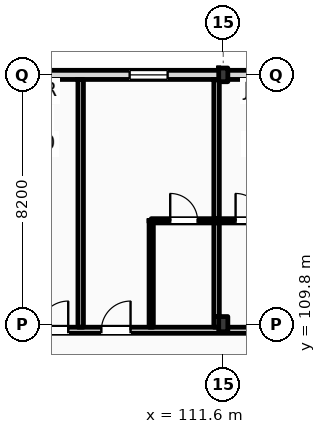
"""IFC4 building model, lengths in metres.
Left out: names, types, materials, properties, quantities, classifications, styles, units other than length and angle.
Written with IfcOpenShell. Run it as: python <this file> out.ifc"""

import sys

from ifc_helpers import new_model, si_unit, direction, frame, frame_2d, origin, origin_2d, place, context, subcontext, project, spatial, rectangle, i_section, extrude, element, fill, save


model = new_model("IFC4")
c1 = context("Model", 3, precision=1e-05, world=origin(), true_north=direction((0.0, 1.0)))
c2 = subcontext(c1, "Body", "Model", "MODEL_VIEW")
j1 = project(units=[si_unit("LENGTHUNIT", "METRE"), si_unit("PLANEANGLEUNIT", "RADIAN")], contexts=[c1])
p1 = place(None, origin())
s1 = spatial("IfcSite", under=j1, at=p1, CompositionType="ELEMENT")
p2 = place(p1, origin())
s2 = spatial("IfcBuilding", under=s1, at=p2, CompositionType="ELEMENT")
p3 = place(p2, frame((0.0, 0.0, 24.6)))
s3 = spatial("IfcBuildingStorey", under=s2, at=p3, CompositionType="ELEMENT", Elevation=24.6)
p4 = place(p3, frame((111.6, 109.8, 0.0), z_axis=(0.0, 0.0, 1.0), x_axis=(1.0, 0.0, 0.0)))
e1 = element("IfcColumn", 1, at=p4, inside=s3, PredefinedType="COLUMN", context=c2, shape_type="SweptSolid", body=[
    extrude(i_section(OverallWidth=0.3, OverallDepth=0.5, WebThickness=0.014, FlangeThickness=0.028, FilletRadius=0.027, at=origin_2d()), origin(), (0.0, 0.0, 1.0), 3.6),
])
p5 = place(p3, frame((111.6, 118.0, 0.0), z_axis=(0.0, 0.0, 1.0), x_axis=(1.0, 0.0, 0.0)))
e2 = element("IfcColumn", 2, at=p5, inside=s3, PredefinedType="COLUMN", context=c2, shape_type="SweptSolid", body=[
    extrude(i_section(OverallWidth=0.3, OverallDepth=0.45, WebThickness=0.014, FlangeThickness=0.026, FilletRadius=0.027, at=origin_2d()), origin(), (0.0, 0.0, 1.0), 3.6),
])
p6 = place(p3, frame((22.5, 118.0, 0.0), z_axis=(0.0, 0.0, 1.0), x_axis=(1.0, 0.0, 0.0)))
e3 = element("IfcWall", 3, at=p6, inside=s3, PredefinedType="STANDARD", context=c2, shape_type="SweptSolid", body=[
    extrude(rectangle(XDim=97.5, YDim=0.3, at=frame_2d((48.75, 0.0))), origin(), (0.0, 0.0, 1.0), 2.78),
])
p7 = place(p6, frame((0.91, 0.0, 0.9)))
e4 = element("IfcOpeningElement", 4, at=p7, cuts=e3, PredefinedType="OPENING", context=c2, shape_type="SweptSolid", body=[
    extrude(rectangle(XDim=0.9, YDim=1.7, at=frame_2d((0.45, 0.85))), frame((0.0, 0.16, 0.0), z_axis=(0.0, -1.0, 0.0), x_axis=(1.0, 0.0, 0.0)), (0.0, 0.0, 1.0), 0.32),
])
p8 = place(p6, frame((6.275, 0.0, 0.0)))
e5 = element("IfcOpeningElement", 5, at=p8, cuts=e3, PredefinedType="OPENING", context=c2, shape_type="SweptSolid", body=[
    extrude(rectangle(XDim=1.2, YDim=2.25, at=frame_2d((0.6, 1.125))), frame((0.0, 0.16, 0.0), z_axis=(0.0, -1.0, 0.0), x_axis=(1.0, 0.0, 0.0)), (0.0, 0.0, 1.0), 0.32),
])
p9 = place(p6, frame((11.42, 0.0, 0.9)))
e6 = element("IfcOpeningElement", 6, at=p9, cuts=e3, PredefinedType="OPENING", context=c2, shape_type="SweptSolid", body=[
    extrude(rectangle(XDim=1.35, YDim=1.7, at=frame_2d((0.675, 0.85))), frame((0.0, 0.16, 0.0), z_axis=(0.0, -1.0, 0.0), x_axis=(1.0, 0.0, 0.0)), (0.0, 0.0, 1.0), 0.32),
])
p10 = place(p6, frame((14.345, 0.0, 0.9)))
e7 = element("IfcOpeningElement", 7, at=p10, cuts=e3, PredefinedType="OPENING", context=c2, shape_type="SweptSolid", body=[
    extrude(rectangle(XDim=1.8, YDim=1.7, at=frame_2d((0.9, 0.85))), frame((0.0, 0.16, 0.0), z_axis=(0.0, -1.0, 0.0), x_axis=(1.0, 0.0, 0.0)), (0.0, 0.0, 1.0), 0.32),
])
p11 = place(p6, frame((19.27, 0.0, 0.9)))
e8 = element("IfcOpeningElement", 8, at=p11, cuts=e3, PredefinedType="OPENING", context=c2, shape_type="SweptSolid", body=[
    extrude(rectangle(XDim=1.95, YDim=1.7, at=frame_2d((0.975, 0.85))), frame((0.0, 0.16, 0.0), z_axis=(0.0, -1.0, 0.0), x_axis=(1.0, 0.0, 0.0)), (0.0, 0.0, 1.0), 0.32),
])
p12 = place(p6, frame((22.97, 0.0, 0.0)))
e9 = element("IfcOpeningElement", 9, at=p12, cuts=e3, PredefinedType="OPENING", context=c2, shape_type="SweptSolid", body=[
    extrude(rectangle(XDim=1.2, YDim=2.25, at=frame_2d((0.6, 1.125))), frame((0.0, 0.16, 0.0), z_axis=(0.0, -1.0, 0.0), x_axis=(1.0, 0.0, 0.0)), (0.0, 0.0, 1.0), 0.32),
])
p13 = place(p6, frame((26.92, 0.0, 0.9)))
e10 = element("IfcOpeningElement", 10, at=p13, cuts=e3, PredefinedType="OPENING", context=c2, shape_type="SweptSolid", body=[
    extrude(rectangle(XDim=2.25, YDim=1.7, at=frame_2d((1.125, 0.85))), frame((0.0, 0.16, 0.0), z_axis=(0.0, -1.0, 0.0), x_axis=(1.0, 0.0, 0.0)), (0.0, 0.0, 1.0), 0.32),
])
p14 = place(p6, frame((30.645, 0.0, 0.9)))
e11 = element("IfcOpeningElement", 11, at=p14, cuts=e3, PredefinedType="OPENING", context=c2, shape_type="SweptSolid", body=[
    extrude(rectangle(XDim=2.4, YDim=1.7, at=frame_2d((1.2, 0.85))), frame((0.0, 0.16, 0.0), z_axis=(0.0, -1.0, 0.0), x_axis=(1.0, 0.0, 0.0)), (0.0, 0.0, 1.0), 0.32),
])
p15 = place(p6, frame((36.71, 0.0, 0.0)))
e12 = element("IfcOpeningElement", 12, at=p15, cuts=e3, PredefinedType="OPENING", context=c2, shape_type="SweptSolid", body=[
    extrude(rectangle(XDim=1.2, YDim=2.25, at=frame_2d((0.6, 1.125))), frame((0.0, 0.16, 0.0), z_axis=(0.0, -1.0, 0.0), x_axis=(1.0, 0.0, 0.0)), (0.0, 0.0, 1.0), 0.32),
])
p16 = place(p6, frame((39.17, 0.0, 0.0)))
e13 = element("IfcOpeningElement", 13, at=p16, cuts=e3, PredefinedType="OPENING", context=c2, shape_type="SweptSolid", body=[
    extrude(rectangle(XDim=1.2, YDim=2.25, at=frame_2d((0.6, 1.125))), frame((0.0, 0.16, 0.0), z_axis=(0.0, -1.0, 0.0), x_axis=(1.0, 0.0, 0.0)), (0.0, 0.0, 1.0), 0.32),
])
p17 = place(p6, frame((43.22, 0.0, 0.9)))
e14 = element("IfcOpeningElement", 14, at=p17, cuts=e3, PredefinedType="OPENING", context=c2, shape_type="SweptSolid", body=[
    extrude(rectangle(XDim=2.85, YDim=1.7, at=frame_2d((1.425, 0.85))), frame((0.0, 0.16, 0.0), z_axis=(0.0, -1.0, 0.0), x_axis=(1.0, 0.0, 0.0)), (0.0, 0.0, 1.0), 0.32),
])
p18 = place(p6, frame((47.29, 0.0, 0.9)))
e15 = element("IfcOpeningElement", 15, at=p18, cuts=e3, PredefinedType="OPENING", context=c2, shape_type="SweptSolid", body=[
    extrude(rectangle(XDim=1.35, YDim=1.7, at=frame_2d((0.675, 0.85))), frame((0.0, 0.16, 0.0), z_axis=(0.0, -1.0, 0.0), x_axis=(1.0, 0.0, 0.0)), (0.0, 0.0, 1.0), 0.32),
])
p19 = place(p6, frame((52.91, 0.0, 0.0)))
e16 = element("IfcOpeningElement", 16, at=p19, cuts=e3, PredefinedType="OPENING", context=c2, shape_type="SweptSolid", body=[
    extrude(rectangle(XDim=1.2, YDim=2.25, at=frame_2d((0.6, 1.125))), frame((0.0, 0.16, 0.0), z_axis=(0.0, -1.0, 0.0), x_axis=(1.0, 0.0, 0.0)), (0.0, 0.0, 1.0), 0.32),
])
p20 = place(p6, frame((55.69, 0.0, 0.9)))
e17 = element("IfcOpeningElement", 17, at=p20, cuts=e3, PredefinedType="OPENING", context=c2, shape_type="SweptSolid", body=[
    extrude(rectangle(XDim=0.9, YDim=1.7, at=frame_2d((0.45, 0.85))), frame((0.0, 0.16, 0.0), z_axis=(0.0, -1.0, 0.0), x_axis=(1.0, 0.0, 0.0)), (0.0, 0.0, 1.0), 0.32),
])
p21 = place(p6, frame((59.82, 0.0, 0.9)))
e18 = element("IfcOpeningElement", 18, at=p21, cuts=e3, PredefinedType="OPENING", context=c2, shape_type="SweptSolid", body=[
    extrude(rectangle(XDim=3.25, YDim=1.7, at=frame_2d((1.625, 0.85))), frame((0.0, 0.16, 0.0), z_axis=(0.0, -1.0, 0.0), x_axis=(1.0, 0.0, 0.0)), (0.0, 0.0, 1.0), 0.32),
])
p22 = place(p6, frame((65.89, 0.0, 0.9)))
e19 = element("IfcOpeningElement", 19, at=p22, cuts=e3, PredefinedType="OPENING", context=c2, shape_type="SweptSolid", body=[
    extrude(rectangle(XDim=1.1, YDim=1.7, at=frame_2d((0.55, 0.85))), frame((0.0, 0.16, 0.0), z_axis=(0.0, -1.0, 0.0), x_axis=(1.0, 0.0, 0.0)), (0.0, 0.0, 1.0), 0.32),
])
p23 = place(p6, frame((69.245, 0.0, 0.0)))
e20 = element("IfcOpeningElement", 20, at=p23, cuts=e3, PredefinedType="OPENING", context=c2, shape_type="SweptSolid", body=[
    extrude(rectangle(XDim=1.2, YDim=2.25, at=frame_2d((0.6, 1.125))), frame((0.0, 0.16, 0.0), z_axis=(0.0, -1.0, 0.0), x_axis=(1.0, 0.0, 0.0)), (0.0, 0.0, 1.0), 0.32),
])
p24 = place(p6, frame((73.69, 0.0, 0.9)))
e21 = element("IfcOpeningElement", 21, at=p24, cuts=e3, PredefinedType="OPENING", context=c2, shape_type="SweptSolid", body=[
    extrude(rectangle(XDim=1.8, YDim=1.7, at=frame_2d((0.9, 0.85))), frame((0.0, 0.16, 0.0), z_axis=(0.0, -1.0, 0.0), x_axis=(1.0, 0.0, 0.0)), (0.0, 0.0, 1.0), 0.32),
])
p25 = place(p6, frame((76.62, 0.0, 0.9)))
e22 = element("IfcOpeningElement", 22, at=p25, cuts=e3, PredefinedType="OPENING", context=c2, shape_type="SweptSolid", body=[
    extrude(rectangle(XDim=3.25, YDim=1.7, at=frame_2d((1.625, 0.85))), frame((0.0, 0.16, 0.0), z_axis=(0.0, -1.0, 0.0), x_axis=(1.0, 0.0, 0.0)), (0.0, 0.0, 1.0), 0.32),
])
p26 = place(p6, frame((81.895, 0.0, 0.9)))
e23 = element("IfcOpeningElement", 23, at=p26, cuts=e3, PredefinedType="OPENING", context=c2, shape_type="SweptSolid", body=[
    extrude(rectangle(XDim=1.1, YDim=1.5, at=frame_2d((0.55, 0.75))), frame((0.0, 0.16, 0.0), z_axis=(0.0, -1.0, 0.0), x_axis=(1.0, 0.0, 0.0)), (0.0, 0.0, 1.0), 0.32),
])
p27 = place(p6, frame((86.02, 0.0, 0.9)))
e24 = element("IfcOpeningElement", 24, at=p27, cuts=e3, PredefinedType="OPENING", context=c2, shape_type="SweptSolid", body=[
    extrude(rectangle(XDim=1.25, YDim=1.6, at=frame_2d((0.625, 0.8))), frame((0.0, 0.16, 0.0), z_axis=(0.0, -1.0, 0.0), x_axis=(1.0, 0.0, 0.0)), (0.0, 0.0, 1.0), 0.32),
])
p28 = place(p6, frame((90.145, 0.0, 0.9)))
e25 = element("IfcOpeningElement", 25, at=p28, cuts=e3, PredefinedType="OPENING", context=c2, shape_type="SweptSolid", body=[
    extrude(rectangle(XDim=1.4, YDim=1.7, at=frame_2d((0.7, 0.85))), frame((0.0, 0.16, 0.0), z_axis=(0.0, -1.0, 0.0), x_axis=(1.0, 0.0, 0.0)), (0.0, 0.0, 1.0), 0.32),
])
p29 = place(p6, frame((94.155, 0.0, 0.9)))
e26 = element("IfcOpeningElement", 26, at=p29, cuts=e3, PredefinedType="OPENING", context=c2, shape_type="SweptSolid", body=[
    extrude(rectangle(XDim=1.6, YDim=1.7, at=frame_2d((0.8, 0.85))), frame((0.0, 0.16, 0.0), z_axis=(0.0, -1.0, 0.0), x_axis=(1.0, 0.0, 0.0)), (0.0, 0.0, 1.0), 0.32),
])
p30 = place(p3, frame((10.65, 109.6, 0.0), z_axis=(0.0, 0.0, 1.0), x_axis=(1.0, 0.0, 0.0)))
e27 = element("IfcWall", 27, at=p30, inside=s3, PredefinedType="PARTITIONING", context=c2, shape_type="SweptSolid", body=[
    extrude(rectangle(XDim=109.21, YDim=0.2, at=frame_2d((54.605, 0.0))), origin(), (0.0, 0.0, 1.0), 2.78),
])
p31 = place(p30, frame((12.705, 0.0, 0.0)))
e28 = element("IfcOpeningElement", 28, at=p31, cuts=e27, PredefinedType="OPENING", context=c2, shape_type="SweptSolid", body=[
    extrude(rectangle(XDim=1.02, YDim=2.2, at=frame_2d((0.51, 1.1))), frame((0.0, 0.11, 0.0), z_axis=(0.0, -1.0, 0.0), x_axis=(1.0, 0.0, 0.0)), (0.0, 0.0, 1.0), 0.22),
])
p32 = place(p30, frame((19.26, 0.0, 0.0)))
e29 = element("IfcOpeningElement", 29, at=p32, cuts=e27, PredefinedType="OPENING", context=c2, shape_type="SweptSolid", body=[
    extrude(rectangle(XDim=1.02, YDim=2.2, at=frame_2d((0.51, 1.1))), frame((0.0, 0.11, 0.0), z_axis=(0.0, -1.0, 0.0), x_axis=(1.0, 0.0, 0.0)), (0.0, 0.0, 1.0), 0.22),
])
p33 = place(p30, frame((23.71, 0.0, 0.0)))
e30 = element("IfcOpeningElement", 30, at=p33, cuts=e27, PredefinedType="OPENING", context=c2, shape_type="SweptSolid", body=[
    extrude(rectangle(XDim=1.02, YDim=2.2, at=frame_2d((0.51, 1.1))), frame((0.0, 0.11, 0.0), z_axis=(0.0, -1.0, 0.0), x_axis=(1.0, 0.0, 0.0)), (0.0, 0.0, 1.0), 0.22),
])
p34 = place(p30, frame((27.66, 0.0, 0.0)))
e31 = element("IfcOpeningElement", 31, at=p34, cuts=e27, PredefinedType="OPENING", context=c2, shape_type="SweptSolid", body=[
    extrude(rectangle(XDim=1.02, YDim=2.2, at=frame_2d((0.51, 1.1))), frame((0.0, 0.11, 0.0), z_axis=(0.0, -1.0, 0.0), x_axis=(1.0, 0.0, 0.0)), (0.0, 0.0, 1.0), 0.22),
])
p35 = place(p30, frame((31.89, 0.0, 0.0)))
e32 = element("IfcOpeningElement", 32, at=p35, cuts=e27, PredefinedType="OPENING", context=c2, shape_type="SweptSolid", body=[
    extrude(rectangle(XDim=0.96, YDim=2.2, at=frame_2d((0.48, 1.1))), frame((0.0, 0.11, 0.0), z_axis=(0.0, -1.0, 0.0), x_axis=(1.0, 0.0, 0.0)), (0.0, 0.0, 1.0), 0.22),
])
p36 = place(p30, frame((33.94, 0.0, 0.0)))
e33 = element("IfcOpeningElement", 33, at=p36, cuts=e27, PredefinedType="OPENING", context=c2, shape_type="SweptSolid", body=[
    extrude(rectangle(XDim=0.96, YDim=2.2, at=frame_2d((0.48, 1.1))), frame((0.0, 0.11, 0.0), z_axis=(0.0, -1.0, 0.0), x_axis=(1.0, 0.0, 0.0)), (0.0, 0.0, 1.0), 0.22),
])
p37 = place(p30, frame((40.29, 0.0, 0.0)))
e34 = element("IfcOpeningElement", 34, at=p37, cuts=e27, PredefinedType="OPENING", context=c2, shape_type="SweptSolid", body=[
    extrude(rectangle(XDim=0.96, YDim=2.2, at=frame_2d((0.48, 1.1))), frame((0.0, 0.11, 0.0), z_axis=(0.0, -1.0, 0.0), x_axis=(1.0, 0.0, 0.0)), (0.0, 0.0, 1.0), 0.22),
])
p38 = place(p30, frame((42.34, 0.0, 0.0)))
e35 = element("IfcOpeningElement", 35, at=p38, cuts=e27, PredefinedType="OPENING", context=c2, shape_type="SweptSolid", body=[
    extrude(rectangle(XDim=0.96, YDim=2.2, at=frame_2d((0.48, 1.1))), frame((0.0, 0.11, 0.0), z_axis=(0.0, -1.0, 0.0), x_axis=(1.0, 0.0, 0.0)), (0.0, 0.0, 1.0), 0.22),
])
p39 = place(p30, frame((48.69, 0.0, 0.0)))
e36 = element("IfcOpeningElement", 36, at=p39, cuts=e27, PredefinedType="OPENING", context=c2, shape_type="SweptSolid", body=[
    extrude(rectangle(XDim=0.96, YDim=2.2, at=frame_2d((0.48, 1.1))), frame((0.0, 0.11, 0.0), z_axis=(0.0, -1.0, 0.0), x_axis=(1.0, 0.0, 0.0)), (0.0, 0.0, 1.0), 0.22),
])
p40 = place(p30, frame((50.74, 0.0, 0.0)))
e37 = element("IfcOpeningElement", 37, at=p40, cuts=e27, PredefinedType="OPENING", context=c2, shape_type="SweptSolid", body=[
    extrude(rectangle(XDim=0.96, YDim=2.2, at=frame_2d((0.48, 1.1))), frame((0.0, 0.11, 0.0), z_axis=(0.0, -1.0, 0.0), x_axis=(1.0, 0.0, 0.0)), (0.0, 0.0, 1.0), 0.22),
])
p41 = place(p30, frame((57.09, 0.0, 0.0)))
e38 = element("IfcOpeningElement", 38, at=p41, cuts=e27, PredefinedType="OPENING", context=c2, shape_type="SweptSolid", body=[
    extrude(rectangle(XDim=0.96, YDim=2.2, at=frame_2d((0.48, 1.1))), frame((0.0, 0.11, 0.0), z_axis=(0.0, -1.0, 0.0), x_axis=(1.0, 0.0, 0.0)), (0.0, 0.0, 1.0), 0.22),
])
p42 = place(p30, frame((59.14, 0.0, 0.0)))
e39 = element("IfcOpeningElement", 39, at=p42, cuts=e27, PredefinedType="OPENING", context=c2, shape_type="SweptSolid", body=[
    extrude(rectangle(XDim=0.96, YDim=2.2, at=frame_2d((0.48, 1.1))), frame((0.0, 0.11, 0.0), z_axis=(0.0, -1.0, 0.0), x_axis=(1.0, 0.0, 0.0)), (0.0, 0.0, 1.0), 0.22),
])
p43 = place(p30, frame((65.49, 0.0, 0.0)))
e40 = element("IfcOpeningElement", 40, at=p43, cuts=e27, PredefinedType="OPENING", context=c2, shape_type="SweptSolid", body=[
    extrude(rectangle(XDim=0.96, YDim=2.2, at=frame_2d((0.48, 1.1))), frame((0.0, 0.11, 0.0), z_axis=(0.0, -1.0, 0.0), x_axis=(1.0, 0.0, 0.0)), (0.0, 0.0, 1.0), 0.22),
])
p44 = place(p30, frame((67.54, 0.0, 0.0)))
e41 = element("IfcOpeningElement", 41, at=p44, cuts=e27, PredefinedType="OPENING", context=c2, shape_type="SweptSolid", body=[
    extrude(rectangle(XDim=0.96, YDim=2.2, at=frame_2d((0.48, 1.1))), frame((0.0, 0.11, 0.0), z_axis=(0.0, -1.0, 0.0), x_axis=(1.0, 0.0, 0.0)), (0.0, 0.0, 1.0), 0.22),
])
p45 = place(p30, frame((73.89, 0.0, 0.0)))
e42 = element("IfcOpeningElement", 42, at=p45, cuts=e27, PredefinedType="OPENING", context=c2, shape_type="SweptSolid", body=[
    extrude(rectangle(XDim=0.96, YDim=2.2, at=frame_2d((0.48, 1.1))), frame((0.0, 0.11, 0.0), z_axis=(0.0, -1.0, 0.0), x_axis=(1.0, 0.0, 0.0)), (0.0, 0.0, 1.0), 0.22),
])
p46 = place(p30, frame((78.09, 0.0, 0.0)))
e43 = element("IfcOpeningElement", 43, at=p46, cuts=e27, PredefinedType="OPENING", context=c2, shape_type="SweptSolid", body=[
    extrude(rectangle(XDim=0.96, YDim=2.2, at=frame_2d((0.48, 1.1))), frame((0.0, 0.11, 0.0), z_axis=(0.0, -1.0, 0.0), x_axis=(1.0, 0.0, 0.0)), (0.0, 0.0, 1.0), 0.22),
])
p47 = place(p30, frame((82.29, 0.0, 0.0)))
e44 = element("IfcOpeningElement", 44, at=p47, cuts=e27, PredefinedType="OPENING", context=c2, shape_type="SweptSolid", body=[
    extrude(rectangle(XDim=0.96, YDim=2.2, at=frame_2d((0.48, 1.1))), frame((0.0, 0.11, 0.0), z_axis=(0.0, -1.0, 0.0), x_axis=(1.0, 0.0, 0.0)), (0.0, 0.0, 1.0), 0.22),
])
p48 = place(p30, frame((86.49, 0.0, 0.0)))
e45 = element("IfcOpeningElement", 45, at=p48, cuts=e27, PredefinedType="OPENING", context=c2, shape_type="SweptSolid", body=[
    extrude(rectangle(XDim=0.96, YDim=2.2, at=frame_2d((0.48, 1.1))), frame((0.0, 0.11, 0.0), z_axis=(0.0, -1.0, 0.0), x_axis=(1.0, 0.0, 0.0)), (0.0, 0.0, 1.0), 0.22),
])
p49 = place(p30, frame((88.54, 0.0, 0.0)))
e46 = element("IfcOpeningElement", 46, at=p49, cuts=e27, PredefinedType="OPENING", context=c2, shape_type="SweptSolid", body=[
    extrude(rectangle(XDim=0.96, YDim=2.2, at=frame_2d((0.48, 1.1))), frame((0.0, 0.11, 0.0), z_axis=(0.0, -1.0, 0.0), x_axis=(1.0, 0.0, 0.0)), (0.0, 0.0, 1.0), 0.22),
])
p50 = place(p30, frame((94.89, 0.0, 0.0)))
e47 = element("IfcOpeningElement", 47, at=p50, cuts=e27, PredefinedType="OPENING", context=c2, shape_type="SweptSolid", body=[
    extrude(rectangle(XDim=0.96, YDim=2.2, at=frame_2d((0.48, 1.1))), frame((0.0, 0.11, 0.0), z_axis=(0.0, -1.0, 0.0), x_axis=(1.0, 0.0, 0.0)), (0.0, 0.0, 1.0), 0.22),
])
p51 = place(p30, frame((96.94, 0.0, 0.0)))
e48 = element("IfcOpeningElement", 48, at=p51, cuts=e27, PredefinedType="OPENING", context=c2, shape_type="SweptSolid", body=[
    extrude(rectangle(XDim=0.96, YDim=2.2, at=frame_2d((0.48, 1.1))), frame((0.0, 0.11, 0.0), z_axis=(0.0, -1.0, 0.0), x_axis=(1.0, 0.0, 0.0)), (0.0, 0.0, 1.0), 0.22),
])
p52 = place(p30, frame((103.29, 0.0, 0.0)))
e49 = element("IfcOpeningElement", 49, at=p52, cuts=e27, PredefinedType="OPENING", context=c2, shape_type="SweptSolid", body=[
    extrude(rectangle(XDim=0.96, YDim=2.2, at=frame_2d((0.48, 1.1))), frame((0.0, 0.11, 0.0), z_axis=(0.0, -1.0, 0.0), x_axis=(1.0, 0.0, 0.0)), (0.0, 0.0, 1.0), 0.22),
])
p53 = place(p30, frame((105.25, 0.0, 0.0)))
e50 = element("IfcOpeningElement", 50, at=p53, cuts=e27, PredefinedType="OPENING", context=c2, shape_type="SweptSolid", body=[
    extrude(rectangle(XDim=0.96, YDim=2.2, at=frame_2d((0.48, 1.1))), frame((0.0, 0.11, 0.0), z_axis=(0.0, -1.0, 0.0), x_axis=(1.0, 0.0, 0.0)), (0.0, 0.0, 1.0), 0.22),
])
p54 = place(p30, frame((2.716, 0.0, 0.0)))
e51 = element("IfcOpeningElement", 51, at=p54, cuts=e27, PredefinedType="OPENING", context=c2, shape_type="SweptSolid", body=[
    extrude(rectangle(XDim=1.35, YDim=2.25, at=frame_2d((0.675, 1.125))), frame((0.0, 0.11, 0.0), z_axis=(0.0, -1.0, 0.0), x_axis=(1.0, 0.0, 0.0)), (0.0, 0.0, 1.0), 0.22),
])
p55 = place(p30, frame((6.65, 0.0, 0.0)))
e52 = element("IfcOpeningElement", 52, at=p55, cuts=e27, PredefinedType="OPENING", context=c2, shape_type="SweptSolid", body=[
    extrude(rectangle(XDim=1.35, YDim=2.25, at=frame_2d((0.675, 1.125))), frame((0.0, 0.11, 0.0), z_axis=(0.0, -1.0, 0.0), x_axis=(1.0, 0.0, 0.0)), (0.0, 0.0, 1.0), 0.22),
])
p56 = place(p30, frame((10.583, 0.0, 0.0)))
e53 = element("IfcOpeningElement", 53, at=p56, cuts=e27, PredefinedType="OPENING", context=c2, shape_type="SweptSolid", body=[
    extrude(rectangle(XDim=1.35, YDim=2.25, at=frame_2d((0.675, 1.125))), frame((0.0, 0.11, 0.0), z_axis=(0.0, -1.0, 0.0), x_axis=(1.0, 0.0, 0.0)), (0.0, 0.0, 1.0), 0.22),
])
p57 = place(p3, frame((106.91, 109.7, 0.0), z_axis=(0.0, 0.0, 1.0), x_axis=(0.0, 1.0, 0.0)))
e54 = element("IfcWall", 54, at=p57, inside=s3, PredefinedType="PARTITIONING", context=c2, shape_type="SweptSolid", body=[
    extrude(rectangle(XDim=8.15, YDim=0.18, at=frame_2d((4.075, 0.0))), origin(), (0.0, 0.0, 1.0), 3.34),
])
p58 = place(p3, frame((111.38, 109.7, 0.0), z_axis=(0.0, 0.0, 1.0), x_axis=(0.0, 1.0, 0.0)))
e55 = element("IfcWall", 55, at=p58, inside=s3, PredefinedType="PARTITIONING", context=c2, shape_type="SweptSolid", body=[
    extrude(rectangle(XDim=8.15, YDim=0.18, at=frame_2d((4.075, 0.0))), origin(), (0.0, 0.0, 1.0), 2.93),
])
p59 = place(p3, frame((109.23, 109.7, 0.0), z_axis=(0.0, 0.0, 1.0), x_axis=(0.0, 1.0, 0.0)))
e56 = element("IfcWall", 56, at=p59, inside=s3, PredefinedType="PARTITIONING", context=c2, shape_type="SweptSolid", body=[
    extrude(rectangle(XDim=3.5, YDim=0.14, at=frame_2d((1.75, 0.0))), origin(), (0.0, 0.0, 1.0), 3.34),
])
p60 = place(p3, frame((109.23, 113.2, 0.0), z_axis=(0.0, 0.0, 1.0), x_axis=(1.0, 0.0, 0.0)))
e57 = element("IfcWall", 57, at=p60, inside=s3, PredefinedType="PARTITIONING", context=c2, shape_type="SweptSolid", body=[
    extrude(rectangle(XDim=2.15, YDim=0.14, at=frame_2d((1.075, 0.0))), origin(), (0.0, 0.0, 1.0), 3.34),
])
p61 = place(p60, frame((0.625, 0.0, 0.0)))
e58 = element("IfcOpeningElement", 58, at=p61, cuts=e57, PredefinedType="OPENING", context=c2, shape_type="SweptSolid", body=[
    extrude(rectangle(XDim=0.9, YDim=2.1, at=frame_2d((0.45, 1.05))), frame((0.0, 0.08, 0.0), z_axis=(0.0, -1.0, 0.0), x_axis=(1.0, 0.0, 0.0)), (0.0, 0.0, 1.0), 0.16),
])
p62 = place(p3, frame((111.38, 113.2, 0.0), z_axis=(0.0, 0.0, 1.0), x_axis=(1.0, 0.0, 0.0)))
e59 = element("IfcWall", 59, at=p62, inside=s3, PredefinedType="PARTITIONING", context=c2, shape_type="SweptSolid", body=[
    extrude(rectangle(XDim=2.15, YDim=0.14, at=frame_2d((1.075, 0.0))), origin(), (0.0, 0.0, 1.0), 3.34),
])
p63 = place(p62, frame((0.625, 0.0, 0.0)))
e60 = element("IfcOpeningElement", 60, at=p63, cuts=e59, PredefinedType="OPENING", context=c2, shape_type="SweptSolid", body=[
    extrude(rectangle(XDim=0.9, YDim=2.1, at=frame_2d((0.45, 1.05))), frame((0.0, 0.08, 0.0), z_axis=(0.0, -1.0, 0.0), x_axis=(1.0, 0.0, 0.0)), (0.0, 0.0, 1.0), 0.16),
])
p64 = place(p27, origin())
e61 = element("IfcWindow", 61, at=p64, inside=s3, PartitioningType="DOUBLE_PANEL_VERTICAL", PredefinedType="WINDOW", context=c2, shape_type="SweptSolid", body=[
    extrude(rectangle(XDim=1.25, YDim=1.6, at=frame_2d((0.625, 0.8))), frame((0.0, 0.03, 0.0), z_axis=(0.0, -1.0, 0.0), x_axis=(1.0, 0.0, 0.0)), (0.0, 0.0, 1.0), 0.06),
])
fill(e24, e61)
p65 = place(p50, origin())
e62 = element("IfcDoor", 62, at=p65, inside=s3, OperationType="SINGLE_SWING_RIGHT", PredefinedType="DOOR", context=c2, shape_type="SweptSolid", body=[
    extrude(rectangle(XDim=0.96, YDim=2.2, at=frame_2d((0.48, 1.1))), frame((0.0, 0.025, 0.0), z_axis=(0.0, -1.0, 0.0), x_axis=(1.0, 0.0, 0.0)), (0.0, 0.0, 1.0), 0.05),
])
fill(e47, e62)
p66 = place(p51, origin())
e63 = element("IfcDoor", 63, at=p66, inside=s3, OperationType="SINGLE_SWING_RIGHT", PredefinedType="DOOR", context=c2, shape_type="SweptSolid", body=[
    extrude(rectangle(XDim=0.96, YDim=2.2, at=frame_2d((0.48, 1.1))), frame((0.0, 0.025, 0.0), z_axis=(0.0, -1.0, 0.0), x_axis=(1.0, 0.0, 0.0)), (0.0, 0.0, 1.0), 0.05),
])
fill(e48, e63)
p67 = place(p61, origin())
e64 = element("IfcDoor", 64, at=p67, inside=s3, OperationType="SINGLE_SWING_LEFT", PredefinedType="DOOR", context=c2, shape_type="SweptSolid", body=[
    extrude(rectangle(XDim=0.9, YDim=2.1, at=frame_2d((0.45, 1.05))), frame((0.0, 0.025, 0.0), z_axis=(0.0, -1.0, 0.0), x_axis=(1.0, 0.0, 0.0)), (0.0, 0.0, 1.0), 0.05),
])
fill(e58, e64)
p68 = place(p63, origin())
e65 = element("IfcDoor", 65, at=p68, inside=s3, OperationType="SINGLE_SWING_LEFT", PredefinedType="DOOR", context=c2, shape_type="SweptSolid", body=[
    extrude(rectangle(XDim=0.9, YDim=2.1, at=frame_2d((0.45, 1.05))), frame((0.0, 0.025, 0.0), z_axis=(0.0, -1.0, 0.0), x_axis=(1.0, 0.0, 0.0)), (0.0, 0.0, 1.0), 0.05),
])
fill(e60, e65)
save(model, sys.argv[1])
